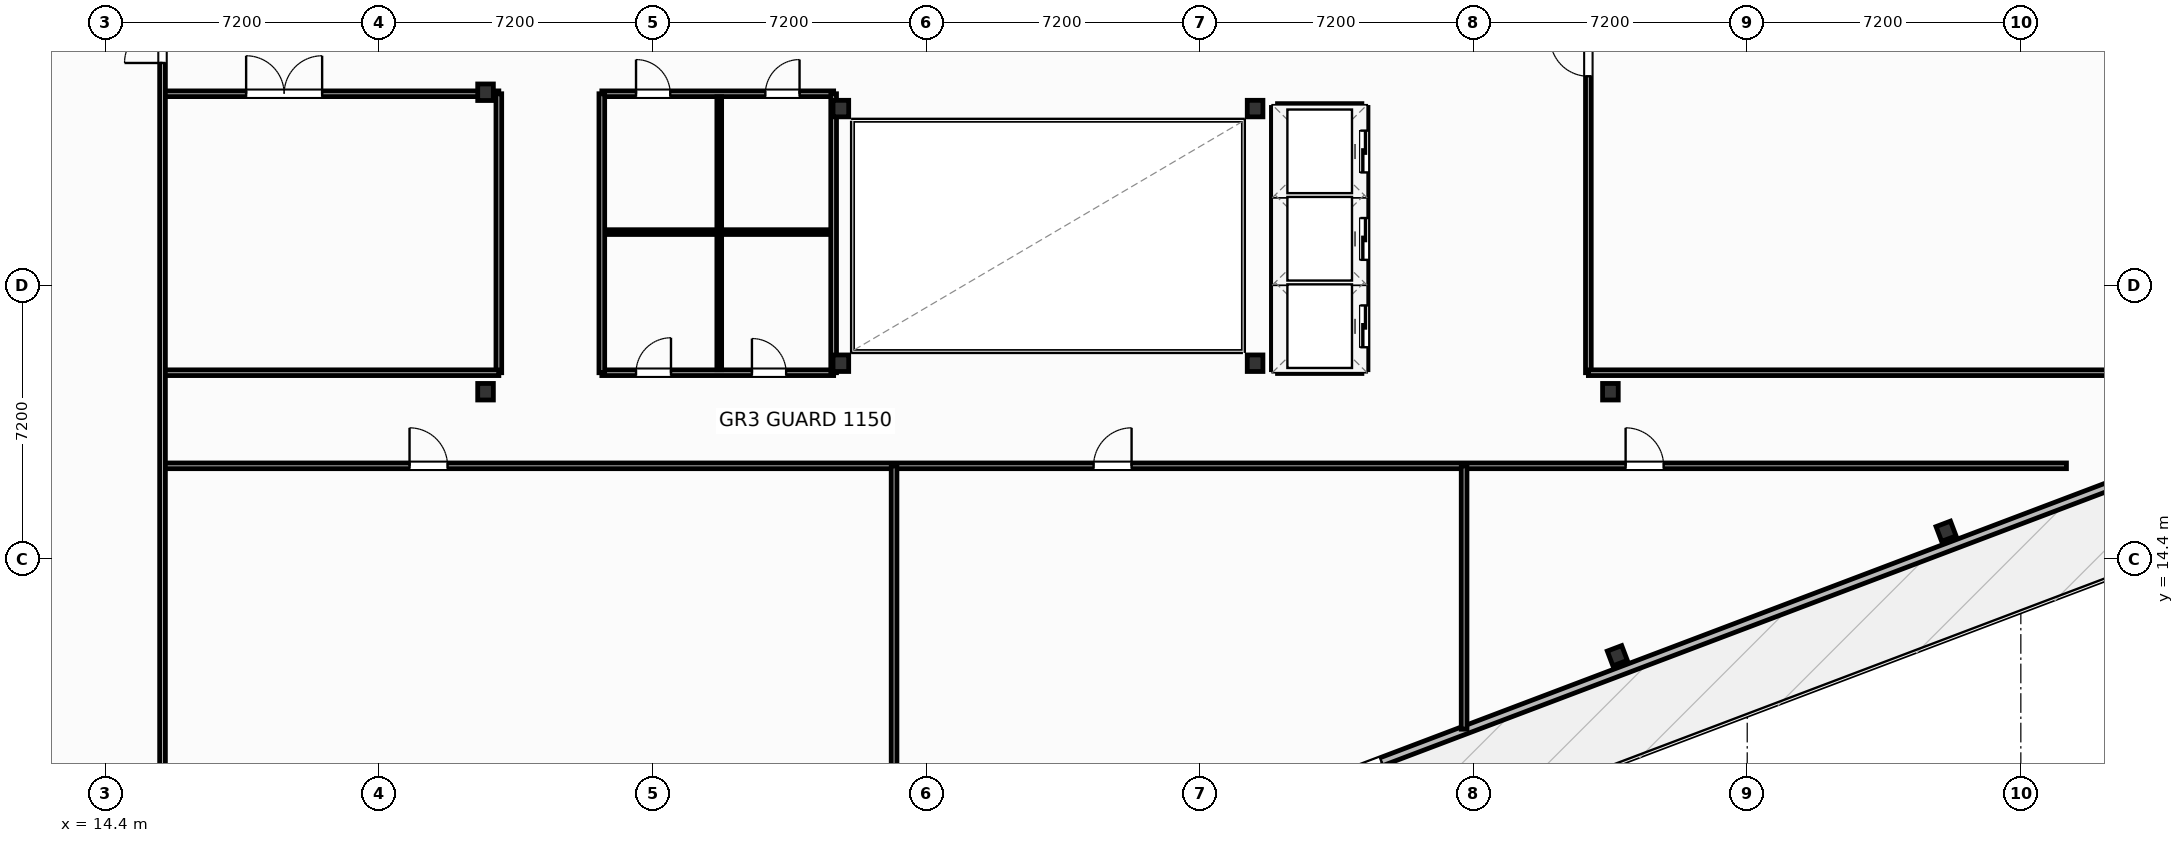
"""IFC4 building model, lengths in metres.
Left out: names, types, materials, properties, quantities, classifications, styles, units other than length and angle.
Written with IfcOpenShell. Run it as: python <this file> out.ifc"""

import sys

from ifc_helpers import new_model, si_unit, direction, frame, frame_2d, origin, origin_2d, place, context, subcontext, project, spatial, rectangle, i_section, extrude, element, fill, save


model = new_model("IFC4")
c1 = context("Model", 3, precision=1e-05, world=origin(), true_north=direction((0.0, 1.0)))
c2 = subcontext(c1, "Body", "Model", "MODEL_VIEW")
j1 = project(units=[si_unit("LENGTHUNIT", "METRE"), si_unit("PLANEANGLEUNIT", "RADIAN")], contexts=[c1])
p1 = place(None, origin())
s1 = spatial("IfcSite", under=j1, at=p1, CompositionType="ELEMENT")
p2 = place(p1, origin())
s2 = spatial("IfcBuilding", under=s1, at=p2, CompositionType="ELEMENT")
p3 = place(p2, frame((0.0, 0.0, 207.9)))
s3 = spatial("IfcBuildingStorey", under=s2, at=p3, CompositionType="ELEMENT", Elevation=207.9)
for number, where, z_axis, x_axis in (
    (1, (33.75, 19.55, 0.0), (0.0, 0.0, 1.0), (1.0, 0.0, 0.0)),
    (2, (44.65, 19.55, 0.0), (0.0, 0.0, 1.0), (1.0, 0.0, 0.0)),
    (3, (33.75, 26.25, 0.0), (0.0, 0.0, 1.0), (1.0, 0.0, 0.0)),
    (4, (44.65, 26.25, 0.0), (0.0, 0.0, 1.0), (1.0, 0.0, 0.0)),
    (5, (24.4, 18.8, 0.0), (0.0, 0.0, 1.0), (1.0, 0.0, 0.0)),
    (6, (24.4, 26.68, 0.0), (0.0, 0.0, 1.0), (1.0, 0.0, 0.0)),
    (7, (54.0, 18.8, 0.0), (0.0, 0.0, 1.0), (1.0, 0.0, 0.0)),
):
    element("IfcColumn", number, at=place(p3, frame(where, z_axis=z_axis, x_axis=x_axis)), inside=s3, PredefinedType="COLUMN", context=c2, shape_type="SweptSolid", body=[
        extrude(i_section(OverallWidth=0.412, OverallDepth=0.435, WebThickness=0.036, FlangeThickness=0.057, FilletRadius=0.025, at=origin_2d()), origin(), (0.0, 0.0, 1.0), 4.8),
    ])
for number, where, z_axis, x_axis in (
    (8, (54.181, 11.853, -0.32), (0.0, 0.0, 1.0), (0.935, 0.354, 0.0)),
    (9, (62.832, 15.128, -0.32), (0.0, 0.0, 1.0), (0.935, 0.354, 0.0)),
):
    element("IfcColumn", number, at=place(p3, frame(where, z_axis=z_axis, x_axis=x_axis)), inside=s3, PredefinedType="COLUMN", context=c2, shape_type="SweptSolid", body=[
        extrude(i_section(OverallWidth=0.406, OverallDepth=0.416, WebThickness=0.03, FlangeThickness=0.048, FilletRadius=0.025, at=origin_2d()), origin(), (0.0, 0.0, 1.0), 5.12),
    ])
p4 = place(p3, frame((70.085, 17.436, 0.0), z_axis=(0.0, 0.0, 1.0), x_axis=(-0.935222646765, -0.354060165759, 0.0)))
e10 = element("IfcWall", 10, at=p4, inside=s3, PredefinedType="SOLIDWALL", context=c2, shape_type="SweptSolid", body=[
    extrude(rectangle(XDim=52.2, YDim=0.22, at=frame_2d((26.1, 0.0))), origin(), (0.0, 0.0, 1.0), 3.83),
])
p5 = place(p4, frame((23.64, 0.0, 0.0)))
e11 = element("IfcOpeningElement", 11, at=p5, cuts=e10, PredefinedType="OPENING", context=c2, shape_type="SweptSolid", body=[
    extrude(rectangle(XDim=1.85, YDim=2.3, at=frame_2d((0.925, 1.15))), frame((0.0, 0.12, 0.0), z_axis=(0.0, -1.0, 0.0), x_axis=(1.0, 0.0, 0.0)), (0.0, 0.0, 1.0), 0.24),
])
p6 = place(p4, frame((0.55, 0.0, 0.75)))
e12 = element("IfcOpeningElement", 12, at=p6, cuts=e10, PredefinedType="OPENING", context=c2, shape_type="SweptSolid", body=[
    extrude(rectangle(XDim=1.85, YDim=1.75, at=frame_2d((0.925, 0.875))), frame((0.0, 0.12, 0.0), z_axis=(0.0, -1.0, 0.0), x_axis=(1.0, 0.0, 0.0)), (0.0, 0.0, 1.0), 0.24),
])
p7 = place(p4, frame((49.8, 0.0, 0.75)))
e13 = element("IfcOpeningElement", 13, at=p7, cuts=e10, PredefinedType="OPENING", context=c2, shape_type="SweptSolid", body=[
    extrude(rectangle(XDim=1.85, YDim=1.75, at=frame_2d((0.925, 0.875))), frame((0.0, 0.12, 0.0), z_axis=(0.0, -1.0, 0.0), x_axis=(1.0, 0.0, 0.0)), (0.0, 0.0, 1.0), 0.24),
])
p8 = place(p3, frame((27.46, 26.64, 0.0), z_axis=(0.0, 0.0, 1.0), x_axis=(1.0, 0.0, 0.0)))
e14 = element("IfcWall", 14, at=p8, inside=s3, PredefinedType="PARTITIONING", context=c2, shape_type="SweptSolid", body=[
    extrude(rectangle(XDim=6.1, YDim=0.15, at=frame_2d((3.05, 0.0))), origin(), (0.0, 0.0, 1.0), 3.762),
])
p9 = place(p8, frame((0.9, 0.0, 0.0)))
e15 = element("IfcOpeningElement", 15, at=p9, cuts=e14, PredefinedType="OPENING", context=c2, shape_type="SweptSolid", body=[
    extrude(rectangle(XDim=0.9, YDim=2.05, at=frame_2d((0.45, 1.025))), frame((0.0, 0.085, 0.0), z_axis=(0.0, -1.0, 0.0), x_axis=(1.0, 0.0, 0.0)), (0.0, 0.0, 1.0), 0.17),
])
p10 = place(p8, frame((4.303, 0.0, 0.0)))
e16 = element("IfcOpeningElement", 16, at=p10, cuts=e14, PredefinedType="OPENING", context=c2, shape_type="SweptSolid", body=[
    extrude(rectangle(XDim=0.9, YDim=2.05, at=frame_2d((0.45, 1.025))), frame((0.0, 0.085, 0.0), z_axis=(0.0, -1.0, 0.0), x_axis=(1.0, 0.0, 0.0)), (0.0, 0.0, 1.0), 0.17),
])
p11 = place(p3, frame((27.46, 19.3, 0.0), z_axis=(0.0, 0.0, 1.0), x_axis=(1.0, 0.0, 0.0)))
e17 = element("IfcWall", 17, at=p11, inside=s3, PredefinedType="PARTITIONING", context=c2, shape_type="SweptSolid", body=[
    extrude(rectangle(XDim=6.1, YDim=0.15, at=frame_2d((3.05, 0.0))), origin(), (0.0, 0.0, 1.0), 3.762),
])
p12 = place(p11, frame((0.9, 0.0, 0.0)))
e18 = element("IfcOpeningElement", 18, at=p12, cuts=e17, PredefinedType="OPENING", context=c2, shape_type="SweptSolid", body=[
    extrude(rectangle(XDim=0.92, YDim=2.05, at=frame_2d((0.46, 1.025))), frame((0.0, 0.085, 0.0), z_axis=(0.0, -1.0, 0.0), x_axis=(1.0, 0.0, 0.0)), (0.0, 0.0, 1.0), 0.17),
])
p13 = place(p11, frame((3.95, 0.0, 0.0)))
e19 = element("IfcOpeningElement", 19, at=p13, cuts=e17, PredefinedType="OPENING", context=c2, shape_type="SweptSolid", body=[
    extrude(rectangle(XDim=0.9, YDim=2.05, at=frame_2d((0.45, 1.025))), frame((0.0, 0.085, 0.0), z_axis=(0.0, -1.0, 0.0), x_axis=(1.0, 0.0, 0.0)), (0.0, 0.0, 1.0), 0.17),
])
p14 = place(p3, frame((30.55, 19.38, 0.0), z_axis=(0.0, 0.0, 1.0), x_axis=(0.0, 1.0, 0.0)))
e20 = element("IfcWall", 20, at=p14, inside=s3, PredefinedType="PARTITIONING", context=c2, shape_type="SweptSolid", body=[
    extrude(rectangle(XDim=7.18, YDim=0.125, at=frame_2d((3.59, 0.0))), origin(), (0.0, 0.0, 1.0), 4.55),
])
p15 = place(p3, frame((27.52, 23.0, 0.0), z_axis=(0.0, 0.0, 1.0), x_axis=(1.0, 0.0, 0.0)))
e21 = element("IfcWall", 21, at=p15, inside=s3, PredefinedType="PARTITIONING", context=c2, shape_type="SweptSolid", body=[
    extrude(rectangle(XDim=6.0, YDim=0.125, at=frame_2d((3.0, 0.0))), origin(), (0.0, 0.0, 1.0), 4.55),
])
p16 = place(p3, frame((27.46, 19.3, 0.0), z_axis=(0.0, 0.0, 1.0), x_axis=(0.0, 1.0, 0.0)))
e22 = element("IfcWall", 22, at=p16, inside=s3, PredefinedType="PARTITIONING", context=c2, shape_type="SweptSolid", body=[
    extrude(rectangle(XDim=7.34, YDim=0.15, at=frame_2d((3.67, 0.0))), origin(), (0.0, 0.0, 1.0), 4.55),
])
p17 = place(p3, frame((33.56, 19.3, 0.0), z_axis=(0.0, 0.0, 1.0), x_axis=(0.0, 1.0, 0.0)))
e23 = element("IfcWall", 23, at=p17, inside=s3, PredefinedType="PARTITIONING", context=c2, shape_type="SweptSolid", body=[
    extrude(rectangle(XDim=7.34, YDim=0.15, at=frame_2d((3.67, 0.0))), origin(), (0.0, 0.0, 1.0), 3.924),
])
p18 = place(p3, frame((15.9, 16.85, 0.0), z_axis=(0.0, 0.0, 1.0), x_axis=(1.0, 0.0, 0.0)))
e24 = element("IfcWall", 24, at=p18, inside=s3, PredefinedType="PARTITIONING", context=c2, shape_type="SweptSolid", body=[
    extrude(rectangle(XDim=50.1, YDim=0.15, at=frame_2d((25.05, 0.0))), origin(), (0.0, 0.0, 1.0), 4.55),
])
p19 = place(p18, frame((6.5, 0.0, 0.0)))
e25 = element("IfcOpeningElement", 25, at=p19, cuts=e24, PredefinedType="OPENING", context=c2, shape_type="SweptSolid", body=[
    extrude(rectangle(XDim=1.0, YDim=2.05, at=frame_2d((0.5, 1.025))), frame((0.0, 0.085, 0.0), z_axis=(0.0, -1.0, 0.0), x_axis=(1.0, 0.0, 0.0)), (0.0, 0.0, 1.0), 0.17),
])
p20 = place(p18, frame((24.5, 0.0, 0.0)))
e26 = element("IfcOpeningElement", 26, at=p20, cuts=e24, PredefinedType="OPENING", context=c2, shape_type="SweptSolid", body=[
    extrude(rectangle(XDim=1.0, YDim=2.05, at=frame_2d((0.5, 1.025))), frame((0.0, 0.085, 0.0), z_axis=(0.0, -1.0, 0.0), x_axis=(1.0, 0.0, 0.0)), (0.0, 0.0, 1.0), 0.17),
])
p21 = place(p18, frame((38.5, 0.0, 0.0)))
e27 = element("IfcOpeningElement", 27, at=p21, cuts=e24, PredefinedType="OPENING", context=c2, shape_type="SweptSolid", body=[
    extrude(rectangle(XDim=1.0, YDim=2.05, at=frame_2d((0.5, 1.025))), frame((0.0, 0.085, 0.0), z_axis=(0.0, -1.0, 0.0), x_axis=(1.0, 0.0, 0.0)), (0.0, 0.0, 1.0), 0.17),
])
p22 = place(p3, frame((35.15, 4.242, 0.0), z_axis=(0.0, 0.0, 1.0), x_axis=(0.0, 1.0, 0.0)))
e28 = element("IfcWall", 28, at=p22, inside=s3, PredefinedType="PARTITIONING", context=c2, shape_type="SweptSolid", body=[
    extrude(rectangle(XDim=12.608, YDim=0.15, at=frame_2d((6.304, 0.0))), origin(), (0.0, 0.0, 1.0), 3.839),
])
p23 = place(p3, frame((50.15, 9.921, 0.0), z_axis=(0.0, 0.0, 1.0), x_axis=(0.0, 1.0, 0.0)))
e29 = element("IfcWall", 29, at=p23, inside=s3, PredefinedType="PARTITIONING", context=c2, shape_type="SweptSolid", body=[
    extrude(rectangle(XDim=6.929, YDim=0.15, at=frame_2d((3.465, 0.0))), origin(), (0.0, 0.0, 1.0), 4.55),
])
p24 = place(p3, frame((15.9, 26.64, 0.0), z_axis=(0.0, 0.0, 1.0), x_axis=(1.0, 0.0, 0.0)))
e30 = element("IfcWall", 30, at=p24, inside=s3, PredefinedType="PARTITIONING", context=c2, shape_type="SweptSolid", body=[
    extrude(rectangle(XDim=8.85, YDim=0.15, at=frame_2d((4.425, 0.0))), origin(), (0.0, 0.0, 1.0), 3.762),
])
p25 = place(p24, frame((2.2, 0.0, 0.0)))
e31 = element("IfcOpeningElement", 31, at=p25, cuts=e30, PredefinedType="OPENING", context=c2, shape_type="SweptSolid", body=[
    extrude(rectangle(XDim=2.0, YDim=2.05, at=frame_2d((1.0, 1.025))), frame((0.0, 0.085, 0.0), z_axis=(0.0, -1.0, 0.0), x_axis=(1.0, 0.0, 0.0)), (0.0, 0.0, 1.0), 0.17),
])
p26 = place(p3, frame((24.75, 19.3, 0.0), z_axis=(0.0, 0.0, 1.0), x_axis=(0.0, 1.0, 0.0)))
e32 = element("IfcWall", 32, at=p26, inside=s3, PredefinedType="PARTITIONING", context=c2, shape_type="SweptSolid", body=[
    extrude(rectangle(XDim=7.34, YDim=0.15, at=frame_2d((3.67, 0.0))), origin(), (0.0, 0.0, 1.0), 4.55),
])
p27 = place(p3, frame((15.9, 19.3, 0.0), z_axis=(0.0, 0.0, 1.0), x_axis=(1.0, 0.0, 0.0)))
e33 = element("IfcWall", 33, at=p27, inside=s3, PredefinedType="PARTITIONING", context=c2, shape_type="SweptSolid", body=[
    extrude(rectangle(XDim=8.85, YDim=0.15, at=frame_2d((4.425, 0.0))), origin(), (0.0, 0.0, 1.0), 4.55),
])
p28 = place(p3, frame((15.9, 0.25, 0.0), z_axis=(0.0, 0.0, 1.0), x_axis=(0.0, 1.0, 0.0)))
e34 = element("IfcWall", 34, at=p28, inside=s3, PredefinedType="PARTITIONING", context=c2, shape_type="SweptSolid", body=[
    extrude(rectangle(XDim=35.754, YDim=0.15, at=frame_2d((17.877, 0.0))), origin(), (0.0, 0.0, 1.0), 4.55),
])
p29 = place(p28, frame((27.2, 0.0, 0.0)))
e35 = element("IfcOpeningElement", 35, at=p29, cuts=e34, PredefinedType="OPENING", context=c2, shape_type="SweptSolid", body=[
    extrude(rectangle(XDim=1.0, YDim=2.05, at=frame_2d((0.5, 1.025))), frame((0.0, 0.085, 0.0), z_axis=(0.0, -1.0, 0.0), x_axis=(1.0, 0.0, 0.0)), (0.0, 0.0, 1.0), 0.17),
])
p30 = place(p3, frame((53.42, 19.3, 0.0), z_axis=(0.0, 0.0, 1.0), x_axis=(0.0, 1.0, 0.0)))
e36 = element("IfcWall", 36, at=p30, inside=s3, PredefinedType="PARTITIONING", context=c2, shape_type="SweptSolid", body=[
    extrude(rectangle(XDim=20.02, YDim=0.15, at=frame_2d((10.01, 0.0))), origin(), (0.0, 0.0, 1.0), 4.55),
])
p31 = place(p30, frame((7.8, 0.0, 0.0)))
e37 = element("IfcOpeningElement", 37, at=p31, cuts=e36, PredefinedType="OPENING", context=c2, shape_type="SweptSolid", body=[
    extrude(rectangle(XDim=1.0, YDim=2.05, at=frame_2d((0.5, 1.025))), frame((0.0, 0.085, 0.0), z_axis=(0.0, -1.0, 0.0), x_axis=(1.0, 0.0, 0.0)), (0.0, 0.0, 1.0), 0.17),
])
p32 = place(p3, frame((53.42, 19.3, 0.0), z_axis=(0.0, 0.0, 1.0), x_axis=(1.0, 0.0, 0.0)))
e38 = element("IfcWall", 38, at=p32, inside=s3, PredefinedType="PARTITIONING", context=c2, shape_type="SweptSolid", body=[
    extrude(rectangle(XDim=19.212, YDim=0.15, at=frame_2d((9.606, 0.0))), origin(), (0.0, 0.0, 1.0), 4.55),
])
for number, where, z_axis, x_axis in (
    (39, (45.24, 21.675, 0.0), (0.0, 0.0, 1.0), (1.0, 0.0, 0.0)),
    (40, (45.24, 23.975, 0.0), (0.0, 0.0, 1.0), (1.0, 0.0, 0.0)),
):
    element("IfcWall", number, at=place(p3, frame(where, z_axis=z_axis, x_axis=x_axis)), inside=s3, PredefinedType="PARTITIONING", context=c2, shape_type="SweptSolid", body=[
        extrude(rectangle(XDim=2.22, YDim=0.2, at=frame_2d((1.11, 0.0))), origin(), (0.0, 0.0, 1.0), 4.55),
    ])
p33 = place(p3, frame((45.24, 19.38, 0.0), z_axis=(0.0, 0.0, 1.0), x_axis=(1.0, 0.0, 0.0)))
e41 = element("IfcWall", 41, at=p33, inside=s3, PredefinedType="PARTITIONING", context=c2, shape_type="SweptSolid", body=[
    extrude(rectangle(XDim=2.22, YDim=0.2, at=frame_2d((1.11, 0.0))), origin(), (0.0, 0.0, 1.0), 3.762),
])
p34 = place(p3, frame((45.24, 26.28, 0.0), z_axis=(0.0, 0.0, 1.0), x_axis=(1.0, 0.0, 0.0)))
e42 = element("IfcWall", 42, at=p34, inside=s3, PredefinedType="PARTITIONING", context=c2, shape_type="SweptSolid", body=[
    extrude(rectangle(XDim=2.22, YDim=0.2, at=frame_2d((1.11, 0.0))), origin(), (0.0, 0.0, 1.0), 4.55),
])
p35 = place(p3, frame((45.18, 19.38, 0.0), z_axis=(0.0, 0.0, 1.0), x_axis=(0.0, 1.0, 0.0)))
e43 = element("IfcWall", 43, at=p35, inside=s3, PredefinedType="PARTITIONING", context=c2, shape_type="SweptSolid", body=[
    extrude(rectangle(XDim=6.9, YDim=0.2, at=frame_2d((3.45, 0.0))), origin(), (0.0, 0.0, 1.0), 4.55),
])
p36 = place(p3, frame((47.52, 19.38, 0.0), z_axis=(0.0, 0.0, 1.0), x_axis=(0.0, 1.0, 0.0)))
e44 = element("IfcWall", 44, at=p36, inside=s3, PredefinedType="PARTITIONING", context=c2, shape_type="SweptSolid", body=[
    extrude(rectangle(XDim=6.9, YDim=0.2, at=frame_2d((3.45, 0.0))), origin(), (0.0, 0.0, 1.0), 4.55),
])
p37 = place(p36, frame((0.59, 0.0, 0.0)))
e45 = element("IfcOpeningElement", 45, at=p37, cuts=e44, PredefinedType="OPENING", context=c2, shape_type="SweptSolid", body=[
    extrude(rectangle(XDim=1.1, YDim=2.15, at=frame_2d((0.55, 1.075))), frame((0.0, 0.11, 0.0), z_axis=(0.0, -1.0, 0.0), x_axis=(1.0, 0.0, 0.0)), (0.0, 0.0, 1.0), 0.22),
])
p38 = place(p36, frame((2.89, 0.0, 0.0)))
e46 = element("IfcOpeningElement", 46, at=p38, cuts=e44, PredefinedType="OPENING", context=c2, shape_type="SweptSolid", body=[
    extrude(rectangle(XDim=1.1, YDim=2.15, at=frame_2d((0.55, 1.075))), frame((0.0, 0.11, 0.0), z_axis=(0.0, -1.0, 0.0), x_axis=(1.0, 0.0, 0.0)), (0.0, 0.0, 1.0), 0.22),
])
p39 = place(p36, frame((5.19, 0.0, 0.0)))
e47 = element("IfcOpeningElement", 47, at=p39, cuts=e44, PredefinedType="OPENING", context=c2, shape_type="SweptSolid", body=[
    extrude(rectangle(XDim=1.1, YDim=2.15, at=frame_2d((0.55, 1.075))), frame((0.0, 0.11, 0.0), z_axis=(0.0, -1.0, 0.0), x_axis=(1.0, 0.0, 0.0)), (0.0, 0.0, 1.0), 0.22),
])
p40 = place(p5, origin())
e48 = element("IfcDoor", 48, at=p40, inside=s3, OperationType="DOUBLE_DOOR_SINGLE_SWING", PredefinedType="DOOR", context=c2, shape_type="SweptSolid", body=[
    extrude(rectangle(XDim=1.85, YDim=2.3, at=frame_2d((0.925, 1.15))), frame((0.0, 0.025, 0.0), z_axis=(0.0, -1.0, 0.0), x_axis=(1.0, 0.0, 0.0)), (0.0, 0.0, 1.0), 0.05),
])
fill(e11, e48)
p41 = place(p9, origin())
e49 = element("IfcDoor", 49, at=p41, inside=s3, OperationType="SINGLE_SWING_LEFT", PredefinedType="DOOR", context=c2, shape_type="SweptSolid", body=[
    extrude(rectangle(XDim=0.9, YDim=2.05, at=frame_2d((0.45, 1.025))), frame((0.0, 0.025, 0.0), z_axis=(0.0, -1.0, 0.0), x_axis=(1.0, 0.0, 0.0)), (0.0, 0.0, 1.0), 0.05),
])
fill(e15, e49)
p42 = place(p10, origin())
e50 = element("IfcDoor", 50, at=p42, inside=s3, OperationType="SINGLE_SWING_RIGHT", PredefinedType="DOOR", context=c2, shape_type="SweptSolid", body=[
    extrude(rectangle(XDim=0.9, YDim=2.05, at=frame_2d((0.45, 1.025))), frame((0.0, 0.025, 0.0), z_axis=(0.0, -1.0, 0.0), x_axis=(1.0, 0.0, 0.0)), (0.0, 0.0, 1.0), 0.05),
])
fill(e16, e50)
p43 = place(p12, origin())
e51 = element("IfcDoor", 51, at=p43, inside=s3, OperationType="SINGLE_SWING_RIGHT", PredefinedType="DOOR", context=c2, shape_type="SweptSolid", body=[
    extrude(rectangle(XDim=0.92, YDim=2.05, at=frame_2d((0.46, 1.025))), frame((0.0, 0.025, 0.0), z_axis=(0.0, -1.0, 0.0), x_axis=(1.0, 0.0, 0.0)), (0.0, 0.0, 1.0), 0.05),
])
fill(e18, e51)
p44 = place(p13, origin())
e52 = element("IfcDoor", 52, at=p44, inside=s3, OperationType="SINGLE_SWING_LEFT", PredefinedType="DOOR", context=c2, shape_type="SweptSolid", body=[
    extrude(rectangle(XDim=0.9, YDim=2.05, at=frame_2d((0.45, 1.025))), frame((0.0, 0.025, 0.0), z_axis=(0.0, -1.0, 0.0), x_axis=(1.0, 0.0, 0.0)), (0.0, 0.0, 1.0), 0.05),
])
fill(e19, e52)
p45 = place(p19, origin())
e53 = element("IfcDoor", 53, at=p45, inside=s3, OperationType="SINGLE_SWING_LEFT", PredefinedType="DOOR", context=c2, shape_type="SweptSolid", body=[
    extrude(rectangle(XDim=1.0, YDim=2.05, at=frame_2d((0.5, 1.025))), frame((0.0, 0.025, 0.0), z_axis=(0.0, -1.0, 0.0), x_axis=(1.0, 0.0, 0.0)), (0.0, 0.0, 1.0), 0.05),
])
fill(e25, e53)
p46 = place(p20, origin())
e54 = element("IfcDoor", 54, at=p46, inside=s3, OperationType="SINGLE_SWING_RIGHT", PredefinedType="DOOR", context=c2, shape_type="SweptSolid", body=[
    extrude(rectangle(XDim=1.0, YDim=2.05, at=frame_2d((0.5, 1.025))), frame((0.0, 0.025, 0.0), z_axis=(0.0, -1.0, 0.0), x_axis=(1.0, 0.0, 0.0)), (0.0, 0.0, 1.0), 0.05),
])
fill(e26, e54)
p47 = place(p21, origin())
e55 = element("IfcDoor", 55, at=p47, inside=s3, OperationType="SINGLE_SWING_LEFT", PredefinedType="DOOR", context=c2, shape_type="SweptSolid", body=[
    extrude(rectangle(XDim=1.0, YDim=2.05, at=frame_2d((0.5, 1.025))), frame((0.0, 0.025, 0.0), z_axis=(0.0, -1.0, 0.0), x_axis=(1.0, 0.0, 0.0)), (0.0, 0.0, 1.0), 0.05),
])
fill(e27, e55)
p48 = place(p25, origin())
e56 = element("IfcDoor", 56, at=p48, inside=s3, OperationType="DOUBLE_DOOR_SINGLE_SWING", PredefinedType="DOOR", context=c2, shape_type="SweptSolid", body=[
    extrude(rectangle(XDim=2.0, YDim=2.05, at=frame_2d((1.0, 1.025))), frame((0.0, 0.025, 0.0), z_axis=(0.0, -1.0, 0.0), x_axis=(1.0, 0.0, 0.0)), (0.0, 0.0, 1.0), 0.05),
])
fill(e31, e56)
p49 = place(p29, origin())
e57 = element("IfcDoor", 57, at=p49, inside=s3, OperationType="SINGLE_SWING_LEFT", PredefinedType="DOOR", context=c2, shape_type="SweptSolid", body=[
    extrude(rectangle(XDim=1.0, YDim=2.05, at=frame_2d((0.5, 1.025))), frame((0.0, 0.025, 0.0), z_axis=(0.0, -1.0, 0.0), x_axis=(1.0, 0.0, 0.0)), (0.0, 0.0, 1.0), 0.05),
])
fill(e35, e57)
p50 = place(p31, origin())
e58 = element("IfcDoor", 58, at=p50, inside=s3, OperationType="SINGLE_SWING_RIGHT", PredefinedType="DOOR", context=c2, shape_type="SweptSolid", body=[
    extrude(rectangle(XDim=1.0, YDim=2.05, at=frame_2d((0.5, 1.025))), frame((0.0, 0.025, 0.0), z_axis=(0.0, -1.0, 0.0), x_axis=(1.0, 0.0, 0.0)), (0.0, 0.0, 1.0), 0.05),
])
fill(e37, e58)
p51 = place(p37, origin())
e59 = element("IfcDoor", 59, at=p51, inside=s3, OperationType="SLIDING_TO_LEFT", PredefinedType="DOOR", context=c2, shape_type="SweptSolid", body=[
    extrude(rectangle(XDim=1.1, YDim=2.15, at=frame_2d((0.55, 1.075))), frame((0.0, 0.025, 0.0), z_axis=(0.0, -1.0, 0.0), x_axis=(1.0, 0.0, 0.0)), (0.0, 0.0, 1.0), 0.05),
])
fill(e45, e59)
p52 = place(p38, origin())
e60 = element("IfcDoor", 60, at=p52, inside=s3, OperationType="SLIDING_TO_LEFT", PredefinedType="DOOR", context=c2, shape_type="SweptSolid", body=[
    extrude(rectangle(XDim=1.1, YDim=2.15, at=frame_2d((0.55, 1.075))), frame((0.0, 0.025, 0.0), z_axis=(0.0, -1.0, 0.0), x_axis=(1.0, 0.0, 0.0)), (0.0, 0.0, 1.0), 0.05),
])
fill(e46, e60)
p53 = place(p39, origin())
e61 = element("IfcDoor", 61, at=p53, inside=s3, OperationType="SLIDING_TO_LEFT", PredefinedType="DOOR", context=c2, shape_type="SweptSolid", body=[
    extrude(rectangle(XDim=1.1, YDim=2.15, at=frame_2d((0.55, 1.075))), frame((0.0, 0.025, 0.0), z_axis=(0.0, -1.0, 0.0), x_axis=(1.0, 0.0, 0.0)), (0.0, 0.0, 1.0), 0.05),
])
fill(e47, e61)
save(model, sys.argv[1])
